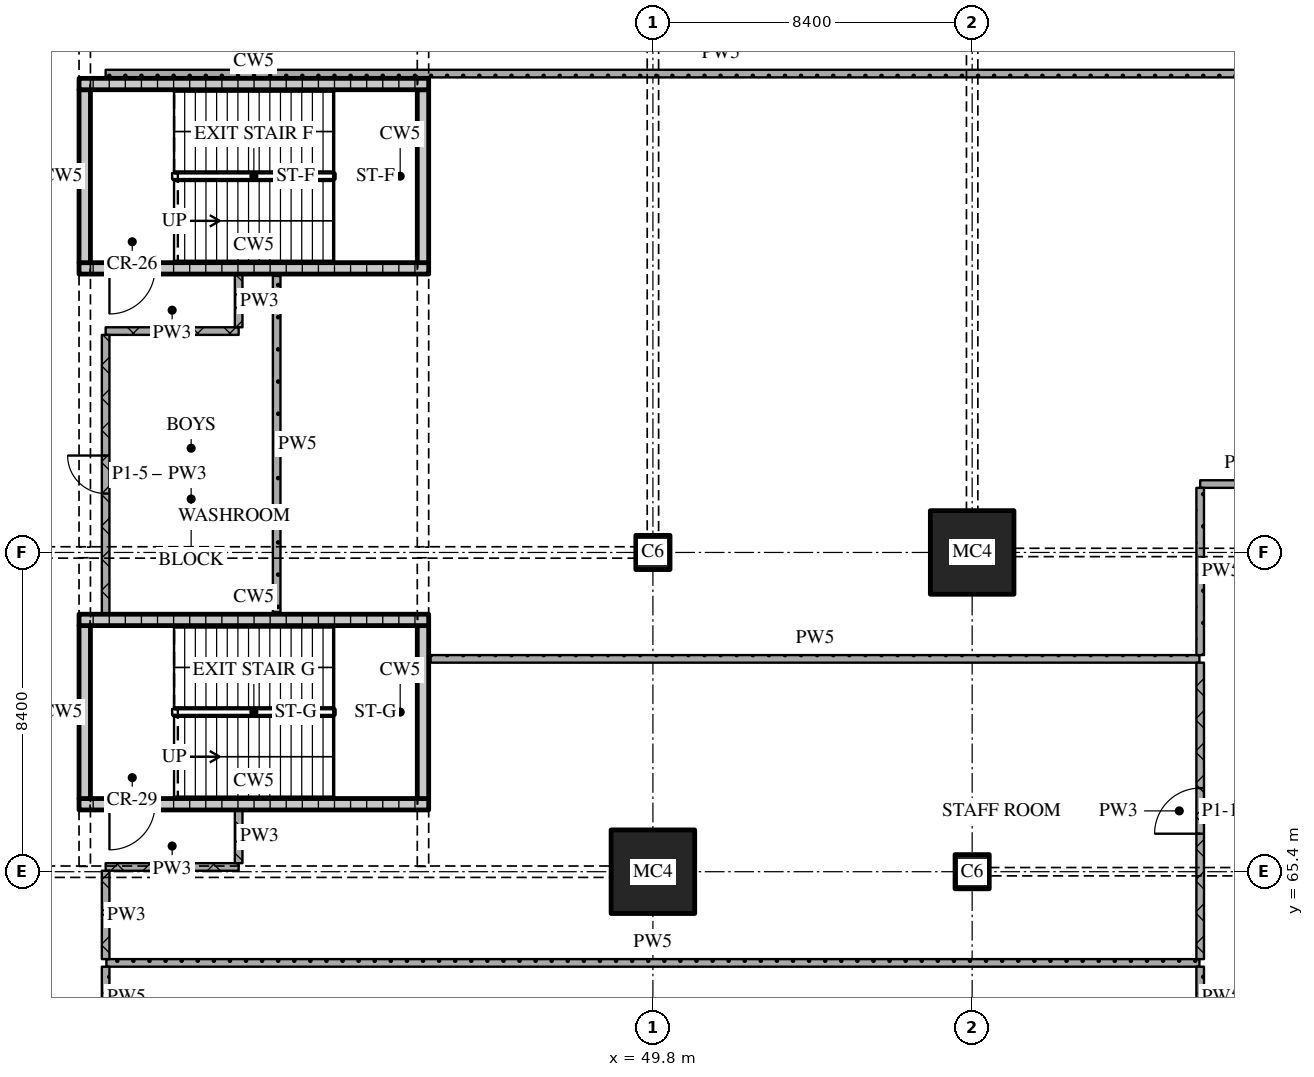
"""IFC4 building model, lengths in metres.
Left out: names, types, materials, properties, quantities, classifications, styles, units other than length and angle.
Written with IfcOpenShell. Run it as: python <this file> out.ifc"""

import sys

from ifc_helpers import new_model, si_unit, direction, frame, frame_2d, origin, origin_2d, place, context, subcontext, project, spatial, rectangle, extrude, element, fill, save


model = new_model("IFC4")
c1 = context("Model", 3, precision=1e-05, world=origin(), true_north=direction((0.0, 1.0)))
c2 = subcontext(c1, "Body", "Model", "MODEL_VIEW")
j1 = project(units=[si_unit("LENGTHUNIT", "METRE"), si_unit("PLANEANGLEUNIT", "RADIAN")], contexts=[c1])
p1 = place(None, origin())
s1 = spatial("IfcSite", under=j1, at=p1, CompositionType="ELEMENT")
p2 = place(p1, origin())
s2 = spatial("IfcBuilding", under=s1, at=p2, CompositionType="ELEMENT")
p3 = place(p2, frame((0.0, 0.0, 9.0)))
s3 = spatial("IfcBuildingStorey", under=s2, at=p3, CompositionType="ELEMENT", Elevation=9.0)
p4 = place(p3, frame((49.8, 65.4, 0.0), z_axis=(0.0, 0.0, 1.0), x_axis=(1.0, 0.0, 0.0)))
e1 = element("IfcColumn", 1, at=p4, inside=s3, PredefinedType="COLUMN", context=c2, shape_type="SweptSolid", body=[
    extrude(rectangle(XDim=2.2, YDim=2.2, at=origin_2d()), origin(), (0.0, 0.0, 1.0), 5.4),
])
for number, where, z_axis, x_axis in (
    (2, (49.8, 73.8, 0.0), (0.0, 0.0, 1.0), (1.0, 0.0, 0.0)),
    (3, (58.2, 65.4, 0.0), (0.0, 0.0, 1.0), (1.0, 0.0, 0.0)),
):
    element("IfcColumn", number, at=place(p3, frame(where, z_axis=z_axis, x_axis=x_axis)), inside=s3, PredefinedType="COLUMN", context=c2, shape_type="SweptSolid", body=[
        extrude(rectangle(XDim=0.9, YDim=0.9, at=origin_2d()), origin(), (0.0, 0.0, 1.0), 5.4),
    ])
p5 = place(p3, frame((58.2, 73.8, 0.0), z_axis=(0.0, 0.0, 1.0), x_axis=(1.0, 0.0, 0.0)))
e4 = element("IfcColumn", 4, at=p5, inside=s3, PredefinedType="COLUMN", context=c2, shape_type="SweptSolid", body=[
    extrude(rectangle(XDim=2.2, YDim=2.2, at=origin_2d()), origin(), (0.0, 0.0, 1.0), 5.4),
])
p6 = place(p3, frame((34.7, 81.275, 0.0), z_axis=(0.0, 0.0, 1.0), x_axis=(1.0, 0.0, 0.0)))
e5 = element("IfcWall", 5, at=p6, inside=s3, PredefinedType="SOLIDWALL", context=c2, shape_type="SweptSolid", body=[
    extrude(rectangle(XDim=9.2, YDim=0.3, at=frame_2d((4.6, 0.0))), origin(), (0.0, 0.0, 1.0), 5.1),
])
p7 = place(p6, frame((0.8, 0.0, 0.0)))
e6 = element("IfcOpeningElement", 6, at=p7, cuts=e5, PredefinedType="OPENING", context=c2, shape_type="SweptSolid", body=[
    extrude(rectangle(XDim=1.2, YDim=2.1, at=frame_2d((0.6, 1.05))), frame((0.0, 0.16, 0.0), z_axis=(0.0, -1.0, 0.0), x_axis=(1.0, 0.0, 0.0)), (0.0, 0.0, 1.0), 0.32),
])
for number, where, z_axis, x_axis in (
    (7, (34.85, 81.425, 0.0), (0.0, 0.0, 1.0), (0.0, 1.0, 0.0)),
    (8, (43.75, 81.425, 0.0), (0.0, 0.0, 1.0), (0.0, 1.0, 0.0)),
):
    element("IfcWall", number, at=place(p3, frame(where, z_axis=z_axis, x_axis=x_axis)), inside=s3, PredefinedType="SOLIDWALL", context=c2, shape_type="SweptSolid", body=[
        extrude(rectangle(XDim=4.55, YDim=0.3, at=frame_2d((2.275, 0.0))), origin(), (0.0, 0.0, 1.0), 5.1),
    ])
p8 = place(p3, frame((34.7, 86.125, 0.0), z_axis=(0.0, 0.0, 1.0), x_axis=(1.0, 0.0, 0.0)))
e9 = element("IfcWall", 9, at=p8, inside=s3, PredefinedType="SOLIDWALL", context=c2, shape_type="SweptSolid", body=[
    extrude(rectangle(XDim=9.2, YDim=0.3, at=frame_2d((4.6, 0.0))), origin(), (0.0, 0.0, 1.0), 5.1),
])
p9 = place(p3, frame((34.7, 67.175, 0.0), z_axis=(0.0, 0.0, 1.0), x_axis=(1.0, 0.0, 0.0)))
e10 = element("IfcWall", 10, at=p9, inside=s3, PredefinedType="SOLIDWALL", context=c2, shape_type="SweptSolid", body=[
    extrude(rectangle(XDim=9.2, YDim=0.3, at=frame_2d((4.6, 0.0))), origin(), (0.0, 0.0, 1.0), 5.1),
])
p10 = place(p9, frame((0.8, 0.0, 0.0)))
e11 = element("IfcOpeningElement", 11, at=p10, cuts=e10, PredefinedType="OPENING", context=c2, shape_type="SweptSolid", body=[
    extrude(rectangle(XDim=1.2, YDim=2.1, at=frame_2d((0.6, 1.05))), frame((0.0, 0.16, 0.0), z_axis=(0.0, -1.0, 0.0), x_axis=(1.0, 0.0, 0.0)), (0.0, 0.0, 1.0), 0.32),
])
for number, where, z_axis, x_axis in (
    (12, (34.85, 67.325, 0.0), (0.0, 0.0, 1.0), (0.0, 1.0, 0.0)),
    (13, (43.75, 67.325, 0.0), (0.0, 0.0, 1.0), (0.0, 1.0, 0.0)),
):
    element("IfcWall", number, at=place(p3, frame(where, z_axis=z_axis, x_axis=x_axis)), inside=s3, PredefinedType="SOLIDWALL", context=c2, shape_type="SweptSolid", body=[
        extrude(rectangle(XDim=4.55, YDim=0.3, at=frame_2d((2.275, 0.0))), origin(), (0.0, 0.0, 1.0), 5.1),
    ])
p11 = place(p3, frame((34.7, 72.025, 0.0), z_axis=(0.0, 0.0, 1.0), x_axis=(1.0, 0.0, 0.0)))
e14 = element("IfcWall", 14, at=p11, inside=s3, PredefinedType="SOLIDWALL", context=c2, shape_type="SweptSolid", body=[
    extrude(rectangle(XDim=9.2, YDim=0.3, at=frame_2d((4.6, 0.0))), origin(), (0.0, 0.0, 1.0), 5.1),
])
p12 = place(p3, frame((35.42, 63.0, 0.0), z_axis=(0.0, 0.0, 1.0), x_axis=(1.0, 0.0, 0.0)))
e15 = element("IfcWall", 15, at=p12, inside=s3, PredefinedType="PARTITIONING", context=c2, shape_type="SweptSolid", body=[
    extrude(rectangle(XDim=28.76, YDim=0.2, at=frame_2d((14.38, 0.0))), origin(), (0.0, 0.0, 1.0), 5.1),
])
p13 = place(p3, frame((35.4, 65.525, 0.0), z_axis=(0.0, 0.0, 1.0), x_axis=(1.0, 0.0, 0.0)))
e16 = element("IfcWall", 16, at=p13, inside=s3, PredefinedType="PARTITIONING", context=c2, shape_type="SweptSolid", body=[
    extrude(rectangle(XDim=3.5, YDim=0.2, at=frame_2d((1.75, 0.0))), origin(), (0.0, 0.0, 1.0), 4.11),
])
p14 = place(p3, frame((43.95, 71.0, 0.0), z_axis=(0.0, 0.0, 1.0), x_axis=(1.0, 0.0, 0.0)))
e17 = element("IfcWall", 17, at=p14, inside=s3, PredefinedType="PARTITIONING", context=c2, shape_type="SweptSolid", body=[
    extrude(rectangle(XDim=20.23, YDim=0.2, at=frame_2d((10.115, 0.0))), origin(), (0.0, 0.0, 1.0), 5.1),
])
p15 = place(p3, frame((64.2, 75.6, 0.0), z_axis=(0.0, 0.0, 1.0), x_axis=(1.0, 0.0, 0.0)))
e18 = element("IfcWall", 18, at=p15, inside=s3, PredefinedType="PARTITIONING", context=c2, shape_type="SweptSolid", body=[
    extrude(rectangle(XDim=2.3, YDim=0.2, at=frame_2d((1.15, 0.0))), origin(), (0.0, 0.0, 1.0), 5.1),
])
p16 = place(p3, frame((35.4, 79.625, 0.0), z_axis=(0.0, 0.0, 1.0), x_axis=(1.0, 0.0, 0.0)))
e19 = element("IfcWall", 19, at=p16, inside=s3, PredefinedType="PARTITIONING", context=c2, shape_type="SweptSolid", body=[
    extrude(rectangle(XDim=3.5, YDim=0.2, at=frame_2d((1.75, 0.0))), origin(), (0.0, 0.0, 1.0), 5.1),
])
p17 = place(p3, frame((35.4, 86.4, 0.0), z_axis=(0.0, 0.0, 1.0), x_axis=(1.0, 0.0, 0.0)))
e20 = element("IfcWall", 20, at=p17, inside=s3, PredefinedType="PARTITIONING", context=c2, shape_type="SweptSolid", body=[
    extrude(rectangle(XDim=32.38, YDim=0.2, at=frame_2d((16.19, 0.0))), origin(), (0.0, 0.0, 1.0), 5.1),
])
p18 = place(p3, frame((35.4, 65.425, 0.0), z_axis=(0.0, 0.0, 1.0), x_axis=(0.0, -1.0, 0.0)))
e21 = element("IfcWall", 21, at=p18, inside=s3, PredefinedType="PARTITIONING", context=c2, shape_type="SweptSolid", body=[
    extrude(rectangle(XDim=2.325, YDim=0.2, at=frame_2d((1.163, 0.0))), origin(), (0.0, 0.0, 1.0), 5.1),
])
p19 = place(p3, frame((35.4, 79.525, 0.0), z_axis=(0.0, 0.0, 1.0), x_axis=(0.0, -1.0, 0.0)))
e22 = element("IfcWall", 22, at=p19, inside=s3, PredefinedType="PARTITIONING", context=c2, shape_type="SweptSolid", body=[
    extrude(rectangle(XDim=7.35, YDim=0.2, at=frame_2d((3.675, 0.0))), origin(), (0.0, 0.0, 1.0), 5.1),
])
p20 = place(p19, frame((3.175, 0.0, 0.0)))
e23 = element("IfcOpeningElement", 23, at=p20, cuts=e22, PredefinedType="OPENING", context=c2, shape_type="SweptSolid", body=[
    extrude(rectangle(XDim=1.0, YDim=2.1, at=frame_2d((0.5, 1.05))), frame((0.0, 0.11, 0.0), z_axis=(0.0, -1.0, 0.0), x_axis=(1.0, 0.0, 0.0)), (0.0, 0.0, 1.0), 0.22),
])
p21 = place(p3, frame((35.4, 62.9, 0.0), z_axis=(0.0, 0.0, 1.0), x_axis=(0.0, -1.0, 0.0)))
e24 = element("IfcWall", 24, at=p21, inside=s3, PredefinedType="PARTITIONING", context=c2, shape_type="SweptSolid", body=[
    extrude(rectangle(XDim=1.6, YDim=0.2, at=frame_2d((0.8, 0.0))), origin(), (0.0, 0.0, 1.0), 5.1),
])
for number, where, z_axis, x_axis in (
    (25, (38.9, 67.025, 0.0), (0.0, 0.0, 1.0), (0.0, -1.0, 0.0)),
    (26, (38.9, 81.125, 0.0), (0.0, 0.0, 1.0), (0.0, -1.0, 0.0)),
):
    element("IfcWall", number, at=place(p3, frame(where, z_axis=z_axis, x_axis=x_axis)), inside=s3, PredefinedType="PARTITIONING", context=c2, shape_type="SweptSolid", body=[
        extrude(rectangle(XDim=1.4, YDim=0.2, at=frame_2d((0.7, 0.0))), origin(), (0.0, 0.0, 1.0), 5.1),
    ])
p22 = place(p3, frame((39.9, 81.075, 0.0), z_axis=(0.0, 0.0, 1.0), x_axis=(0.0, -1.0, 0.0)))
e27 = element("IfcWall", 27, at=p22, inside=s3, PredefinedType="PARTITIONING", context=c2, shape_type="SweptSolid", body=[
    extrude(rectangle(XDim=8.85, YDim=0.2, at=frame_2d((4.425, 0.0))), origin(), (0.0, 0.0, 1.0), 5.1),
])
p23 = place(p3, frame((64.2, 63.1, 0.0), z_axis=(0.0, 0.0, 1.0), x_axis=(0.0, 1.0, 0.0)))
e28 = element("IfcWall", 28, at=p23, inside=s3, PredefinedType="PARTITIONING", context=c2, shape_type="SweptSolid", body=[
    extrude(rectangle(XDim=7.8, YDim=0.2, at=frame_2d((3.9, 0.0))), origin(), (0.0, 0.0, 1.0), 5.1),
])
p24 = place(p23, frame((3.3, 0.0, 0.0)))
e29 = element("IfcOpeningElement", 29, at=p24, cuts=e28, PredefinedType="OPENING", context=c2, shape_type="SweptSolid", body=[
    extrude(rectangle(XDim=1.2, YDim=2.1, at=frame_2d((0.6, 1.05))), frame((0.0, 0.11, 0.0), z_axis=(0.0, -1.0, 0.0), x_axis=(1.0, 0.0, 0.0)), (0.0, 0.0, 1.0), 0.22),
])
p25 = place(p3, frame((64.2, 62.9, 0.0), z_axis=(0.0, 0.0, 1.0), x_axis=(0.0, -1.0, 0.0)))
e30 = element("IfcWall", 30, at=p25, inside=s3, PredefinedType="PARTITIONING", context=c2, shape_type="SweptSolid", body=[
    extrude(rectangle(XDim=1.6, YDim=0.2, at=frame_2d((0.8, 0.0))), origin(), (0.0, 0.0, 1.0), 5.1),
])
p26 = place(p3, frame((64.2, 75.5, 0.0), z_axis=(0.0, 0.0, 1.0), x_axis=(0.0, -1.0, 0.0)))
e31 = element("IfcWall", 31, at=p26, inside=s3, PredefinedType="PARTITIONING", context=c2, shape_type="SweptSolid", body=[
    extrude(rectangle(XDim=4.4, YDim=0.2, at=frame_2d((2.2, 0.0))), origin(), (0.0, 0.0, 1.0), 5.1),
])
p27 = place(p7, origin())
e32 = element("IfcDoor", 32, at=p27, inside=s3, OperationType="SINGLE_SWING_RIGHT", PredefinedType="DOOR", context=c2, shape_type="SweptSolid", body=[
    extrude(rectangle(XDim=1.2, YDim=2.1, at=frame_2d((0.6, 1.05))), frame((0.0, 0.025, 0.0), z_axis=(0.0, -1.0, 0.0), x_axis=(1.0, 0.0, 0.0)), (0.0, 0.0, 1.0), 0.05),
])
fill(e6, e32)
p28 = place(p10, origin())
e33 = element("IfcDoor", 33, at=p28, inside=s3, OperationType="SINGLE_SWING_RIGHT", PredefinedType="DOOR", context=c2, shape_type="SweptSolid", body=[
    extrude(rectangle(XDim=1.2, YDim=2.1, at=frame_2d((0.6, 1.05))), frame((0.0, 0.025, 0.0), z_axis=(0.0, -1.0, 0.0), x_axis=(1.0, 0.0, 0.0)), (0.0, 0.0, 1.0), 0.05),
])
fill(e11, e33)
p29 = place(p20, origin())
e34 = element("IfcDoor", 34, at=p29, inside=s3, OperationType="SINGLE_SWING_RIGHT", PredefinedType="DOOR", context=c2, shape_type="SweptSolid", body=[
    extrude(rectangle(XDim=1.0, YDim=2.1, at=frame_2d((0.5, 1.05))), frame((0.0, 0.025, 0.0), z_axis=(0.0, -1.0, 0.0), x_axis=(1.0, 0.0, 0.0)), (0.0, 0.0, 1.0), 0.05),
])
fill(e23, e34)
p30 = place(p24, origin())
e35 = element("IfcDoor", 35, at=p30, inside=s3, OperationType="SINGLE_SWING_LEFT", PredefinedType="DOOR", context=c2, shape_type="SweptSolid", body=[
    extrude(rectangle(XDim=1.2, YDim=2.1, at=frame_2d((0.6, 1.05))), frame((0.0, 0.025, 0.0), z_axis=(0.0, -1.0, 0.0), x_axis=(1.0, 0.0, 0.0)), (0.0, 0.0, 1.0), 0.05),
])
fill(e29, e35)
save(model, sys.argv[1])
